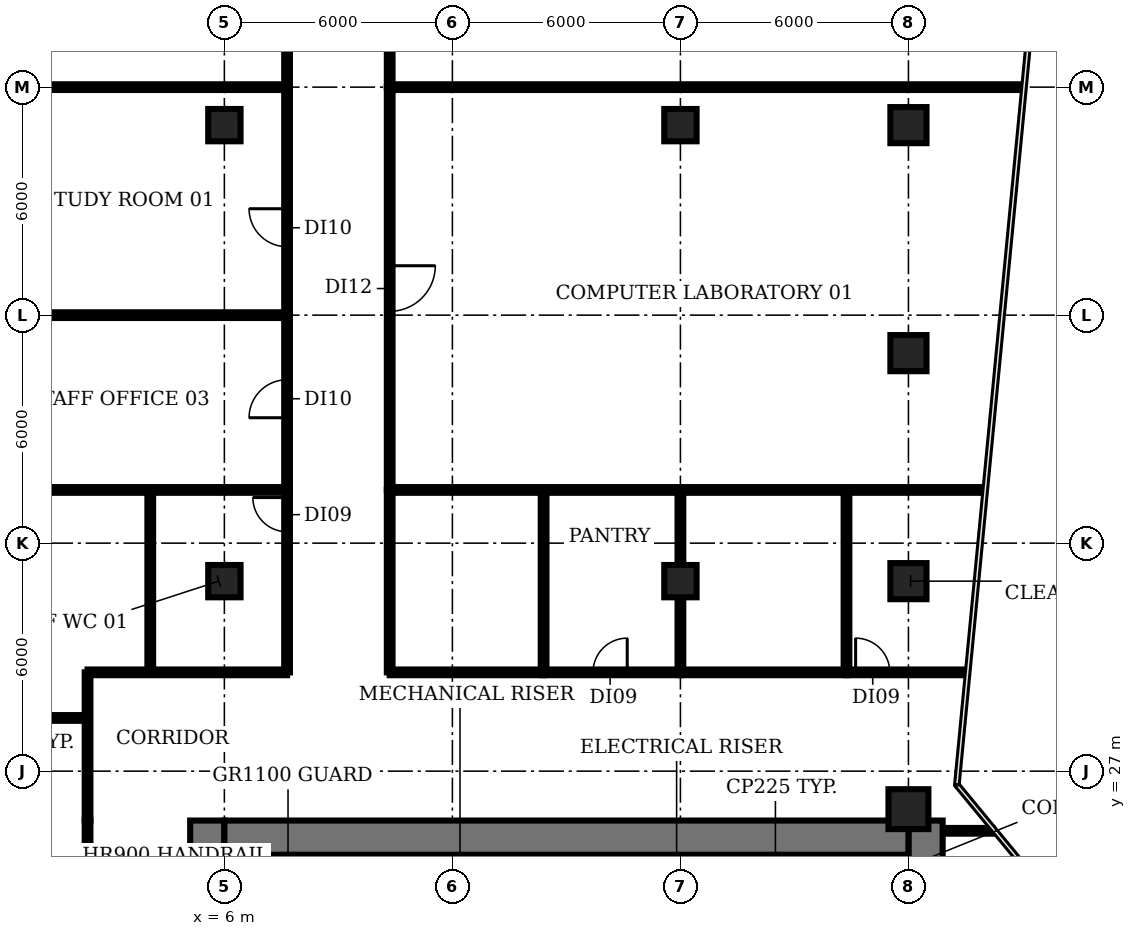
"""IFC4 building model, lengths in metres.
Left out: names, types, materials, properties, quantities, classifications, styles, units other than length and angle.
Written with IfcOpenShell. Run it as: python <this file> out.ifc"""

import sys

from ifc_helpers import new_model, si_unit, direction, frame, frame_2d, origin, origin_2d, place, context, subcontext, project, spatial, rectangle, circle, extrude, element, fill, save


model = new_model("IFC4")
c1 = context("Model", 3, precision=1e-05, world=origin(), true_north=direction((0.0, 1.0)))
c2 = subcontext(c1, "Body", "Model", "MODEL_VIEW")
j1 = project(units=[si_unit("LENGTHUNIT", "METRE"), si_unit("PLANEANGLEUNIT", "RADIAN")], contexts=[c1])
p1 = place(None, origin())
s1 = spatial("IfcSite", under=j1, at=p1, CompositionType="ELEMENT")
p2 = place(p1, origin())
s2 = spatial("IfcBuilding", under=s1, at=p2, CompositionType="ELEMENT")
p3 = place(p2, frame((0.0, 0.0, 29.0)))
s3 = spatial("IfcBuildingStorey", under=s2, at=p3, CompositionType="ELEMENT", Elevation=29.0)
for number, where, z_axis, x_axis in (
    (1, (6.0, 32.0, 0.0), (0.0, 0.0, 1.0), (1.0, 0.0, 0.0)),
    (2, (6.0, 44.0, 0.0), (0.0, 0.0, 1.0), (1.0, 0.0, 0.0)),
    (3, (18.0, 32.0, 0.0), (0.0, 0.0, 1.0), (1.0, 0.0, 0.0)),
    (4, (18.0, 44.0, 0.0), (0.0, 0.0, 1.0), (1.0, 0.0, 0.0)),
):
    element("IfcColumn", number, at=place(p3, frame(where, z_axis=z_axis, x_axis=x_axis)), inside=s3, PredefinedType="COLUMN", context=c2, shape_type="SweptSolid", body=[
        extrude(rectangle(XDim=0.85, YDim=0.85, at=origin_2d()), origin(), (0.0, 0.0, 1.0), 3.85),
    ])
p4 = place(p3, frame((24.0, 26.0, 0.0), z_axis=(0.0, 0.0, 1.0), x_axis=(1.0, 0.0, 0.0)))
e5 = element("IfcColumn", 5, at=p4, inside=s3, PredefinedType="COLUMN", context=c2, shape_type="SweptSolid", body=[
    extrude(circle(Radius=0.525, at=origin_2d()), origin(), (0.0, 0.0, 1.0), 3.85),
])
for number, where, z_axis, x_axis in (
    (6, (24.0, 32.0, 0.0), (0.0, 0.0, 1.0), (1.0, 0.0, 0.0)),
    (7, (24.0, 38.0, 0.0), (0.0, 0.0, 1.0), (1.0, 0.0, 0.0)),
    (8, (24.0, 44.0, 0.0), (0.0, 0.0, 1.0), (1.0, 0.0, 0.0)),
):
    element("IfcColumn", number, at=place(p3, frame(where, z_axis=z_axis, x_axis=x_axis)), inside=s3, PredefinedType="COLUMN", context=c2, shape_type="SweptSolid", body=[
        extrude(rectangle(XDim=0.95, YDim=0.95, at=origin_2d()), origin(), (0.0, 0.0, 1.0), 3.85),
    ])
p5 = place(p3, frame((9.275, 18.375, 0.0), z_axis=(0.0, 0.0, 1.0), x_axis=(0.0, 1.0, 0.0)))
e9 = element("IfcWall", 9, at=p5, inside=s3, PredefinedType="SHEAR", context=c2, shape_type="SweptSolid", body=[
    extrude(rectangle(XDim=6.425, YDim=0.25, at=frame_2d((3.212, 0.0))), origin(), (0.0, 0.0, 1.0), 3.85),
])
for number, where, z_axis, x_axis in (
    (10, (15.1, 22.9, 0.0), (0.0, 0.0, 1.0), (0.0, 1.0, 0.0)),
    (11, (20.7, 22.9, 0.0), (0.0, 0.0, 1.0), (0.0, 1.0, 0.0)),
):
    element("IfcWall", number, at=place(p3, frame(where, z_axis=z_axis, x_axis=x_axis)), inside=s3, PredefinedType="SHEAR", context=c2, shape_type="SweptSolid", body=[
        extrude(rectangle(XDim=1.9, YDim=0.2, at=frame_2d((0.95, 0.0))), origin(), (0.0, 0.0, 1.0), 3.85),
    ])
p6 = place(p3, frame((5.55, 4.5, 0.0), z_axis=(0.0, 0.0, 1.0), x_axis=(0.0, 1.0, 0.0)))
e12 = element("IfcWall", 12, at=p6, inside=s3, PredefinedType="SHEAR", context=c2, shape_type="SweptSolid", body=[
    extrude(rectangle(XDim=21.2, YDim=0.9, at=frame_2d((10.6, 0.0))), origin(), (0.0, 0.0, 1.0), 3.85),
])
p7 = place(p6, frame((1.15, 0.0, 0.0)))
e13 = element("IfcOpeningElement", 13, at=p7, cuts=e12, PredefinedType="OPENING", context=c2, shape_type="SweptSolid", body=[
    extrude(rectangle(XDim=1.5, YDim=2.1, at=frame_2d((0.75, 1.05))), frame((0.0, 0.46, 0.0), z_axis=(0.0, -1.0, 0.0), x_axis=(1.0, 0.0, 0.0)), (0.0, 0.0, 1.0), 0.92),
])
p8 = place(p6, frame((7.6, 0.0, 0.0)))
e14 = element("IfcOpeningElement", 14, at=p8, cuts=e12, PredefinedType="OPENING", context=c2, shape_type="SweptSolid", body=[
    extrude(rectangle(XDim=1.2, YDim=2.1, at=frame_2d((0.6, 1.05))), frame((0.0, 0.46, 0.0), z_axis=(0.0, -1.0, 0.0), x_axis=(1.0, 0.0, 0.0)), (0.0, 0.0, 1.0), 0.92),
])
p9 = place(p6, frame((14.15, 0.0, 0.0)))
e15 = element("IfcOpeningElement", 15, at=p9, cuts=e12, PredefinedType="OPENING", context=c2, shape_type="SweptSolid", body=[
    extrude(rectangle(XDim=1.2, YDim=2.1, at=frame_2d((0.6, 1.05))), frame((0.0, 0.46, 0.0), z_axis=(0.0, -1.0, 0.0), x_axis=(1.0, 0.0, 0.0)), (0.0, 0.0, 1.0), 0.92),
])
p10 = place(p3, frame((24.45, 25.7, 0.0), z_axis=(0.0, 0.0, 1.0), x_axis=(0.0, -1.0, 0.0)))
e16 = element("IfcWall", 16, at=p10, inside=s3, PredefinedType="SHEAR", context=c2, shape_type="SweptSolid", body=[
    extrude(rectangle(XDim=21.2, YDim=0.9, at=frame_2d((10.6, 0.0))), origin(), (0.0, 0.0, 1.0), 3.85),
])
p11 = place(p10, frame((18.55, 0.0, 0.0)))
e17 = element("IfcOpeningElement", 17, at=p11, cuts=e16, PredefinedType="OPENING", context=c2, shape_type="SweptSolid", body=[
    extrude(rectangle(XDim=1.5, YDim=2.1, at=frame_2d((0.75, 1.05))), frame((0.0, 0.46, 0.0), z_axis=(0.0, -1.0, 0.0), x_axis=(1.0, 0.0, 0.0)), (0.0, 0.0, 1.0), 0.92),
])
p12 = place(p10, frame((12.45, 0.0, 0.0)))
e18 = element("IfcOpeningElement", 18, at=p12, cuts=e16, PredefinedType="OPENING", context=c2, shape_type="SweptSolid", body=[
    extrude(rectangle(XDim=0.9, YDim=2.1, at=frame_2d((0.45, 1.05))), frame((0.0, 0.46, 0.0), z_axis=(0.0, -1.0, 0.0), x_axis=(1.0, 0.0, 0.0)), (0.0, 0.0, 1.0), 0.92),
])
p13 = place(p10, frame((6.45, 0.0, 0.0)))
e19 = element("IfcOpeningElement", 19, at=p13, cuts=e16, PredefinedType="OPENING", context=c2, shape_type="SweptSolid", body=[
    extrude(rectangle(XDim=2.0, YDim=2.1, at=frame_2d((1.0, 1.05))), frame((0.0, 0.46, 0.0), z_axis=(0.0, -1.0, 0.0), x_axis=(1.0, 0.0, 0.0)), (0.0, 0.0, 1.0), 0.92),
])
p14 = place(p3, frame((6.0, 25.25, 0.0), z_axis=(0.0, 0.0, 1.0), x_axis=(1.0, 0.0, 0.0)))
e20 = element("IfcWall", 20, at=p14, inside=s3, PredefinedType="SHEAR", context=c2, shape_type="SweptSolid", body=[
    extrude(rectangle(XDim=18.0, YDim=0.9, at=frame_2d((9.0, 0.0))), origin(), (0.0, 0.0, 1.0), 3.85),
])
p15 = place(p3, frame((-1.01, 28.4, 0.0), z_axis=(0.0, 0.0, 1.0), x_axis=(1.0, 0.0, 0.0)))
e21 = element("IfcWall", 21, at=p15, inside=s3, PredefinedType="PARTITIONING", context=c2, shape_type="SweptSolid", body=[
    extrude(rectangle(XDim=3.41, YDim=0.15, at=frame_2d((1.705, 0.0))), origin(), (0.0, 0.0, 1.0), 2.83),
])
for number, where, z_axis, x_axis in (
    (22, (-1.01, 34.4, 0.0), (0.0, 0.0, 1.0), (1.0, 0.0, 0.0)),
    (23, (-1.01, 39.0, 0.0), (0.0, 0.0, 1.0), (1.0, 0.0, 0.0)),
    (24, (-1.01, 45.0, 0.0), (0.0, 0.0, 1.0), (1.0, 0.0, 0.0)),
):
    element("IfcWall", number, at=place(p3, frame(where, z_axis=z_axis, x_axis=x_axis)), inside=s3, PredefinedType="PARTITIONING", context=c2, shape_type="SweptSolid", body=[
        extrude(rectangle(XDim=8.66, YDim=0.15, at=frame_2d((4.33, 0.0))), origin(), (0.0, 0.0, 1.0), 2.83),
    ])
p16 = place(p3, frame((2.4, 4.5, 0.0), z_axis=(0.0, 0.0, 1.0), x_axis=(0.0, 1.0, 0.0)))
e25 = element("IfcWall", 25, at=p16, inside=s3, PredefinedType="PARTITIONING", context=c2, shape_type="SweptSolid", body=[
    extrude(rectangle(XDim=21.2, YDim=0.15, at=frame_2d((10.6, 0.0))), origin(), (0.0, 0.0, 1.0), 2.83),
])
p17 = place(p16, frame((10.8, 0.0, 0.0)))
e26 = element("IfcOpeningElement", 26, at=p17, cuts=e25, PredefinedType="OPENING", context=c2, shape_type="SweptSolid", body=[
    extrude(rectangle(XDim=1.2, YDim=2.1, at=frame_2d((0.6, 1.05))), frame((0.0, 0.085, 0.0), z_axis=(0.0, -1.0, 0.0), x_axis=(1.0, 0.0, 0.0)), (0.0, 0.0, 1.0), 0.17),
])
p18 = place(p3, frame((2.4, 25.7, 0.0), z_axis=(0.0, 0.0, 1.0), x_axis=(0.0, 1.0, 0.0)))
e27 = element("IfcWall", 27, at=p18, inside=s3, PredefinedType="PARTITIONING", context=c2, shape_type="SweptSolid", body=[
    extrude(rectangle(XDim=3.9, YDim=0.15, at=frame_2d((1.95, 0.0))), origin(), (0.0, 0.0, 1.0), 2.83),
])
p19 = place(p3, frame((2.4, 29.6, 0.0), z_axis=(0.0, 0.0, 1.0), x_axis=(1.0, 0.0, 0.0)))
e28 = element("IfcWall", 28, at=p19, inside=s3, PredefinedType="PARTITIONING", context=c2, shape_type="SweptSolid", body=[
    extrude(rectangle(XDim=5.25, YDim=0.15, at=frame_2d((2.625, 0.0))), origin(), (0.0, 0.0, 1.0), 2.83),
])
p20 = place(p3, frame((4.05, 29.6, 0.0), z_axis=(0.0, 0.0, 1.0), x_axis=(0.0, 1.0, 0.0)))
e29 = element("IfcWall", 29, at=p20, inside=s3, PredefinedType="PARTITIONING", context=c2, shape_type="SweptSolid", body=[
    extrude(rectangle(XDim=4.8, YDim=0.15, at=frame_2d((2.4, 0.0))), origin(), (0.0, 0.0, 1.0), 2.83),
])
p21 = place(p3, frame((7.65, 29.6, 0.0), z_axis=(0.0, 0.0, 1.0), x_axis=(0.0, 1.0, 0.0)))
e30 = element("IfcWall", 30, at=p21, inside=s3, PredefinedType="PARTITIONING", context=c2, shape_type="SweptSolid", body=[
    extrude(rectangle(XDim=4.8, YDim=0.15, at=frame_2d((2.4, 0.0))), origin(), (0.0, 0.0, 1.0), 2.83),
])
p22 = place(p21, frame((3.7, 0.0, 0.0)))
e31 = element("IfcOpeningElement", 31, at=p22, cuts=e30, PredefinedType="OPENING", context=c2, shape_type="SweptSolid", body=[
    extrude(rectangle(XDim=0.9, YDim=2.1, at=frame_2d((0.45, 1.05))), frame((0.0, 0.085, 0.0), z_axis=(0.0, -1.0, 0.0), x_axis=(1.0, 0.0, 0.0)), (0.0, 0.0, 1.0), 0.17),
])
p23 = place(p3, frame((7.65, 34.4, 0.0), z_axis=(0.0, 0.0, 1.0), x_axis=(0.0, 1.0, 0.0)))
e32 = element("IfcWall", 32, at=p23, inside=s3, PredefinedType="PARTITIONING", context=c2, shape_type="SweptSolid", body=[
    extrude(rectangle(XDim=4.6, YDim=0.15, at=frame_2d((2.3, 0.0))), origin(), (0.0, 0.0, 1.0), 2.83),
])
p24 = place(p23, frame((1.9, 0.0, 0.0)))
e33 = element("IfcOpeningElement", 33, at=p24, cuts=e32, PredefinedType="OPENING", context=c2, shape_type="SweptSolid", body=[
    extrude(rectangle(XDim=1.0, YDim=2.1, at=frame_2d((0.5, 1.05))), frame((0.0, 0.085, 0.0), z_axis=(0.0, -1.0, 0.0), x_axis=(1.0, 0.0, 0.0)), (0.0, 0.0, 1.0), 0.17),
])
p25 = place(p3, frame((7.65, 39.0, 0.0), z_axis=(0.0, 0.0, 1.0), x_axis=(0.0, 1.0, 0.0)))
e34 = element("IfcWall", 34, at=p25, inside=s3, PredefinedType="PARTITIONING", context=c2, shape_type="SweptSolid", body=[
    extrude(rectangle(XDim=6.0, YDim=0.15, at=frame_2d((3.0, 0.0))), origin(), (0.0, 0.0, 1.0), 2.83),
])
p26 = place(p25, frame((1.8, 0.0, 0.0)))
e35 = element("IfcOpeningElement", 35, at=p26, cuts=e34, PredefinedType="OPENING", context=c2, shape_type="SweptSolid", body=[
    extrude(rectangle(XDim=1.0, YDim=2.1, at=frame_2d((0.5, 1.05))), frame((0.0, 0.085, 0.0), z_axis=(0.0, -1.0, 0.0), x_axis=(1.0, 0.0, 0.0)), (0.0, 0.0, 1.0), 0.17),
])
p27 = place(p3, frame((7.65, 45.0, 0.0), z_axis=(0.0, 0.0, 1.0), x_axis=(0.0, 1.0, 0.0)))
e36 = element("IfcWall", 36, at=p27, inside=s3, PredefinedType="PARTITIONING", context=c2, shape_type="SweptSolid", body=[
    extrude(rectangle(XDim=12.0, YDim=0.15, at=frame_2d((6.0, 0.0))), origin(), (0.0, 0.0, 1.0), 2.83),
])
p28 = place(p27, frame((5.5, 0.0, 0.0)))
e37 = element("IfcOpeningElement", 37, at=p28, cuts=e36, PredefinedType="OPENING", context=c2, shape_type="SweptSolid", body=[
    extrude(rectangle(XDim=1.2, YDim=2.1, at=frame_2d((0.6, 1.05))), frame((0.0, 0.085, 0.0), z_axis=(0.0, -1.0, 0.0), x_axis=(1.0, 0.0, 0.0)), (0.0, 0.0, 1.0), 0.17),
])
p29 = place(p3, frame((10.35, 29.6, 0.0), z_axis=(0.0, 0.0, 1.0), x_axis=(0.0, 1.0, 0.0)))
e38 = element("IfcWall", 38, at=p29, inside=s3, PredefinedType="PARTITIONING", context=c2, shape_type="SweptSolid", body=[
    extrude(rectangle(XDim=4.8, YDim=0.15, at=frame_2d((2.4, 0.0))), origin(), (0.0, 0.0, 1.0), 2.83),
])
p30 = place(p3, frame((10.35, 29.6, 0.0), z_axis=(0.0, 0.0, 1.0), x_axis=(1.0, 0.0, 0.0)))
e39 = element("IfcWall", 39, at=p30, inside=s3, PredefinedType="PARTITIONING", context=c2, shape_type="SweptSolid", body=[
    extrude(rectangle(XDim=4.05, YDim=0.15, at=frame_2d((2.025, 0.0))), origin(), (0.0, 0.0, 1.0), 2.83),
])
p31 = place(p3, frame((10.35, 34.4, 0.0), z_axis=(0.0, 0.0, 1.0), x_axis=(1.0, 0.0, 0.0)))
e40 = element("IfcWall", 40, at=p31, inside=s3, PredefinedType="PARTITIONING", context=c2, shape_type="SweptSolid", body=[
    extrude(rectangle(XDim=15.62, YDim=0.15, at=frame_2d((7.81, 0.0))), origin(), (0.0, 0.0, 1.0), 2.83),
])
p32 = place(p3, frame((10.35, 45.0, 0.0), z_axis=(0.0, 0.0, 1.0), x_axis=(0.0, -1.0, 0.0)))
e41 = element("IfcWall", 41, at=p32, inside=s3, PredefinedType="PARTITIONING", context=c2, shape_type="SweptSolid", body=[
    extrude(rectangle(XDim=10.6, YDim=0.15, at=frame_2d((5.3, 0.0))), origin(), (0.0, 0.0, 1.0), 2.83),
])
p33 = place(p32, frame((4.7, 0.0, 0.0)))
e42 = element("IfcOpeningElement", 42, at=p33, cuts=e41, PredefinedType="OPENING", context=c2, shape_type="SweptSolid", body=[
    extrude(rectangle(XDim=1.2, YDim=2.1, at=frame_2d((0.6, 1.05))), frame((0.0, 0.085, 0.0), z_axis=(0.0, -1.0, 0.0), x_axis=(1.0, 0.0, 0.0)), (0.0, 0.0, 1.0), 0.17),
])
p34 = place(p3, frame((10.35, 45.0, 0.0), z_axis=(0.0, 0.0, 1.0), x_axis=(1.0, 0.0, 0.0)))
e43 = element("IfcWall", 43, at=p34, inside=s3, PredefinedType="PARTITIONING", context=c2, shape_type="SweptSolid", body=[
    extrude(rectangle(XDim=16.615, YDim=0.15, at=frame_2d((8.307, 0.0))), origin(), (0.0, 0.0, 1.0), 2.83),
])
p35 = place(p3, frame((10.35, 51.0, 0.0), z_axis=(0.0, 0.0, 1.0), x_axis=(0.0, -1.0, 0.0)))
e44 = element("IfcWall", 44, at=p35, inside=s3, PredefinedType="PARTITIONING", context=c2, shape_type="SweptSolid", body=[
    extrude(rectangle(XDim=6.0, YDim=0.15, at=frame_2d((3.0, 0.0))), origin(), (0.0, 0.0, 1.0), 2.83),
])
p36 = place(p35, frame((2.4, 0.0, 0.0)))
e45 = element("IfcOpeningElement", 45, at=p36, cuts=e44, PredefinedType="OPENING", context=c2, shape_type="SweptSolid", body=[
    extrude(rectangle(XDim=1.0, YDim=2.1, at=frame_2d((0.5, 1.05))), frame((0.0, 0.085, 0.0), z_axis=(0.0, -1.0, 0.0), x_axis=(1.0, 0.0, 0.0)), (0.0, 0.0, 1.0), 0.17),
])
p37 = place(p3, frame((14.4, 29.6, 0.0), z_axis=(0.0, 0.0, 1.0), x_axis=(0.0, 1.0, 0.0)))
e46 = element("IfcWall", 46, at=p37, inside=s3, PredefinedType="PARTITIONING", context=c2, shape_type="SweptSolid", body=[
    extrude(rectangle(XDim=4.8, YDim=0.15, at=frame_2d((2.4, 0.0))), origin(), (0.0, 0.0, 1.0), 2.83),
])
p38 = place(p3, frame((14.4, 29.6, 0.0), z_axis=(0.0, 0.0, 1.0), x_axis=(1.0, 0.0, 0.0)))
e47 = element("IfcWall", 47, at=p38, inside=s3, PredefinedType="PARTITIONING", context=c2, shape_type="SweptSolid", body=[
    extrude(rectangle(XDim=3.6, YDim=0.15, at=frame_2d((1.8, 0.0))), origin(), (0.0, 0.0, 1.0), 2.83),
])
p39 = place(p38, frame((1.3, 0.0, 0.0)))
e48 = element("IfcOpeningElement", 48, at=p39, cuts=e47, PredefinedType="OPENING", context=c2, shape_type="SweptSolid", body=[
    extrude(rectangle(XDim=0.9, YDim=2.1, at=frame_2d((0.45, 1.05))), frame((0.0, 0.085, 0.0), z_axis=(0.0, -1.0, 0.0), x_axis=(1.0, 0.0, 0.0)), (0.0, 0.0, 1.0), 0.17),
])
p40 = place(p3, frame((18.0, 29.6, 0.0), z_axis=(0.0, 0.0, 1.0), x_axis=(0.0, 1.0, 0.0)))
e49 = element("IfcWall", 49, at=p40, inside=s3, PredefinedType="PARTITIONING", context=c2, shape_type="SweptSolid", body=[
    extrude(rectangle(XDim=4.8, YDim=0.15, at=frame_2d((2.4, 0.0))), origin(), (0.0, 0.0, 1.0), 2.83),
])
p41 = place(p3, frame((18.0, 29.6, 0.0), z_axis=(0.0, 0.0, 1.0), x_axis=(1.0, 0.0, 0.0)))
e50 = element("IfcWall", 50, at=p41, inside=s3, PredefinedType="PARTITIONING", context=c2, shape_type="SweptSolid", body=[
    extrude(rectangle(XDim=4.37, YDim=0.15, at=frame_2d((2.185, 0.0))), origin(), (0.0, 0.0, 1.0), 2.83),
])
p42 = place(p3, frame((22.37, 29.6, 0.0), z_axis=(0.0, 0.0, 1.0), x_axis=(0.0, 1.0, 0.0)))
e51 = element("IfcWall", 51, at=p42, inside=s3, PredefinedType="PARTITIONING", context=c2, shape_type="SweptSolid", body=[
    extrude(rectangle(XDim=4.8, YDim=0.15, at=frame_2d((2.4, 0.0))), origin(), (0.0, 0.0, 1.0), 2.83),
])
p43 = place(p3, frame((22.37, 29.6, 0.0), z_axis=(0.0, 0.0, 1.0), x_axis=(1.0, 0.0, 0.0)))
e52 = element("IfcWall", 52, at=p43, inside=s3, PredefinedType="PARTITIONING", context=c2, shape_type="SweptSolid", body=[
    extrude(rectangle(XDim=3.14, YDim=0.15, at=frame_2d((1.57, 0.0))), origin(), (0.0, 0.0, 1.0), 2.83),
])
p44 = place(p43, frame((0.24, 0.0, 0.0)))
e53 = element("IfcOpeningElement", 53, at=p44, cuts=e52, PredefinedType="OPENING", context=c2, shape_type="SweptSolid", body=[
    extrude(rectangle(XDim=0.9, YDim=2.1, at=frame_2d((0.45, 1.05))), frame((0.0, 0.085, 0.0), z_axis=(0.0, -1.0, 0.0), x_axis=(1.0, 0.0, 0.0)), (0.0, 0.0, 1.0), 0.17),
])
p45 = place(p3, frame((25.0, 25.43, 0.0), z_axis=(0.0, 0.0, 1.0), x_axis=(1.0, 0.0, 0.0)))
e54 = element("IfcWall", 54, at=p45, inside=s3, PredefinedType="PARTITIONING", context=c2, shape_type="SweptSolid", body=[
    extrude(rectangle(XDim=1.21, YDim=0.15, at=frame_2d((0.605, 0.0))), origin(), (0.0, 0.0, 1.0), 2.83),
])
p46 = place(p22, origin())
e55 = element("IfcDoor", 55, at=p46, inside=s3, OperationType="SINGLE_SWING_RIGHT", PredefinedType="DOOR", context=c2, shape_type="SweptSolid", body=[
    extrude(rectangle(XDim=0.9, YDim=2.1, at=frame_2d((0.45, 1.05))), frame((0.0, 0.025, 0.0), z_axis=(0.0, -1.0, 0.0), x_axis=(1.0, 0.0, 0.0)), (0.0, 0.0, 1.0), 0.05),
])
fill(e31, e55)
p47 = place(p24, origin())
e56 = element("IfcDoor", 56, at=p47, inside=s3, OperationType="SINGLE_SWING_LEFT", PredefinedType="DOOR", context=c2, shape_type="SweptSolid", body=[
    extrude(rectangle(XDim=1.0, YDim=2.1, at=frame_2d((0.5, 1.05))), frame((0.0, 0.025, 0.0), z_axis=(0.0, -1.0, 0.0), x_axis=(1.0, 0.0, 0.0)), (0.0, 0.0, 1.0), 0.05),
])
fill(e33, e56)
p48 = place(p26, origin())
e57 = element("IfcDoor", 57, at=p48, inside=s3, OperationType="SINGLE_SWING_RIGHT", PredefinedType="DOOR", context=c2, shape_type="SweptSolid", body=[
    extrude(rectangle(XDim=1.0, YDim=2.1, at=frame_2d((0.5, 1.05))), frame((0.0, 0.025, 0.0), z_axis=(0.0, -1.0, 0.0), x_axis=(1.0, 0.0, 0.0)), (0.0, 0.0, 1.0), 0.05),
])
fill(e35, e57)
p49 = place(p33, origin())
e58 = element("IfcDoor", 58, at=p49, inside=s3, OperationType="SINGLE_SWING_LEFT", PredefinedType="DOOR", context=c2, shape_type="SweptSolid", body=[
    extrude(rectangle(XDim=1.2, YDim=2.1, at=frame_2d((0.6, 1.05))), frame((0.0, 0.025, 0.0), z_axis=(0.0, -1.0, 0.0), x_axis=(1.0, 0.0, 0.0)), (0.0, 0.0, 1.0), 0.05),
])
fill(e42, e58)
p50 = place(p39, origin())
e59 = element("IfcDoor", 59, at=p50, inside=s3, OperationType="SINGLE_SWING_RIGHT", PredefinedType="DOOR", context=c2, shape_type="SweptSolid", body=[
    extrude(rectangle(XDim=0.9, YDim=2.1, at=frame_2d((0.45, 1.05))), frame((0.0, 0.025, 0.0), z_axis=(0.0, -1.0, 0.0), x_axis=(1.0, 0.0, 0.0)), (0.0, 0.0, 1.0), 0.05),
])
fill(e48, e59)
p51 = place(p44, origin())
e60 = element("IfcDoor", 60, at=p51, inside=s3, OperationType="SINGLE_SWING_LEFT", PredefinedType="DOOR", context=c2, shape_type="SweptSolid", body=[
    extrude(rectangle(XDim=0.9, YDim=2.1, at=frame_2d((0.45, 1.05))), frame((0.0, 0.025, 0.0), z_axis=(0.0, -1.0, 0.0), x_axis=(1.0, 0.0, 0.0)), (0.0, 0.0, 1.0), 0.05),
])
fill(e53, e60)
save(model, sys.argv[1])
